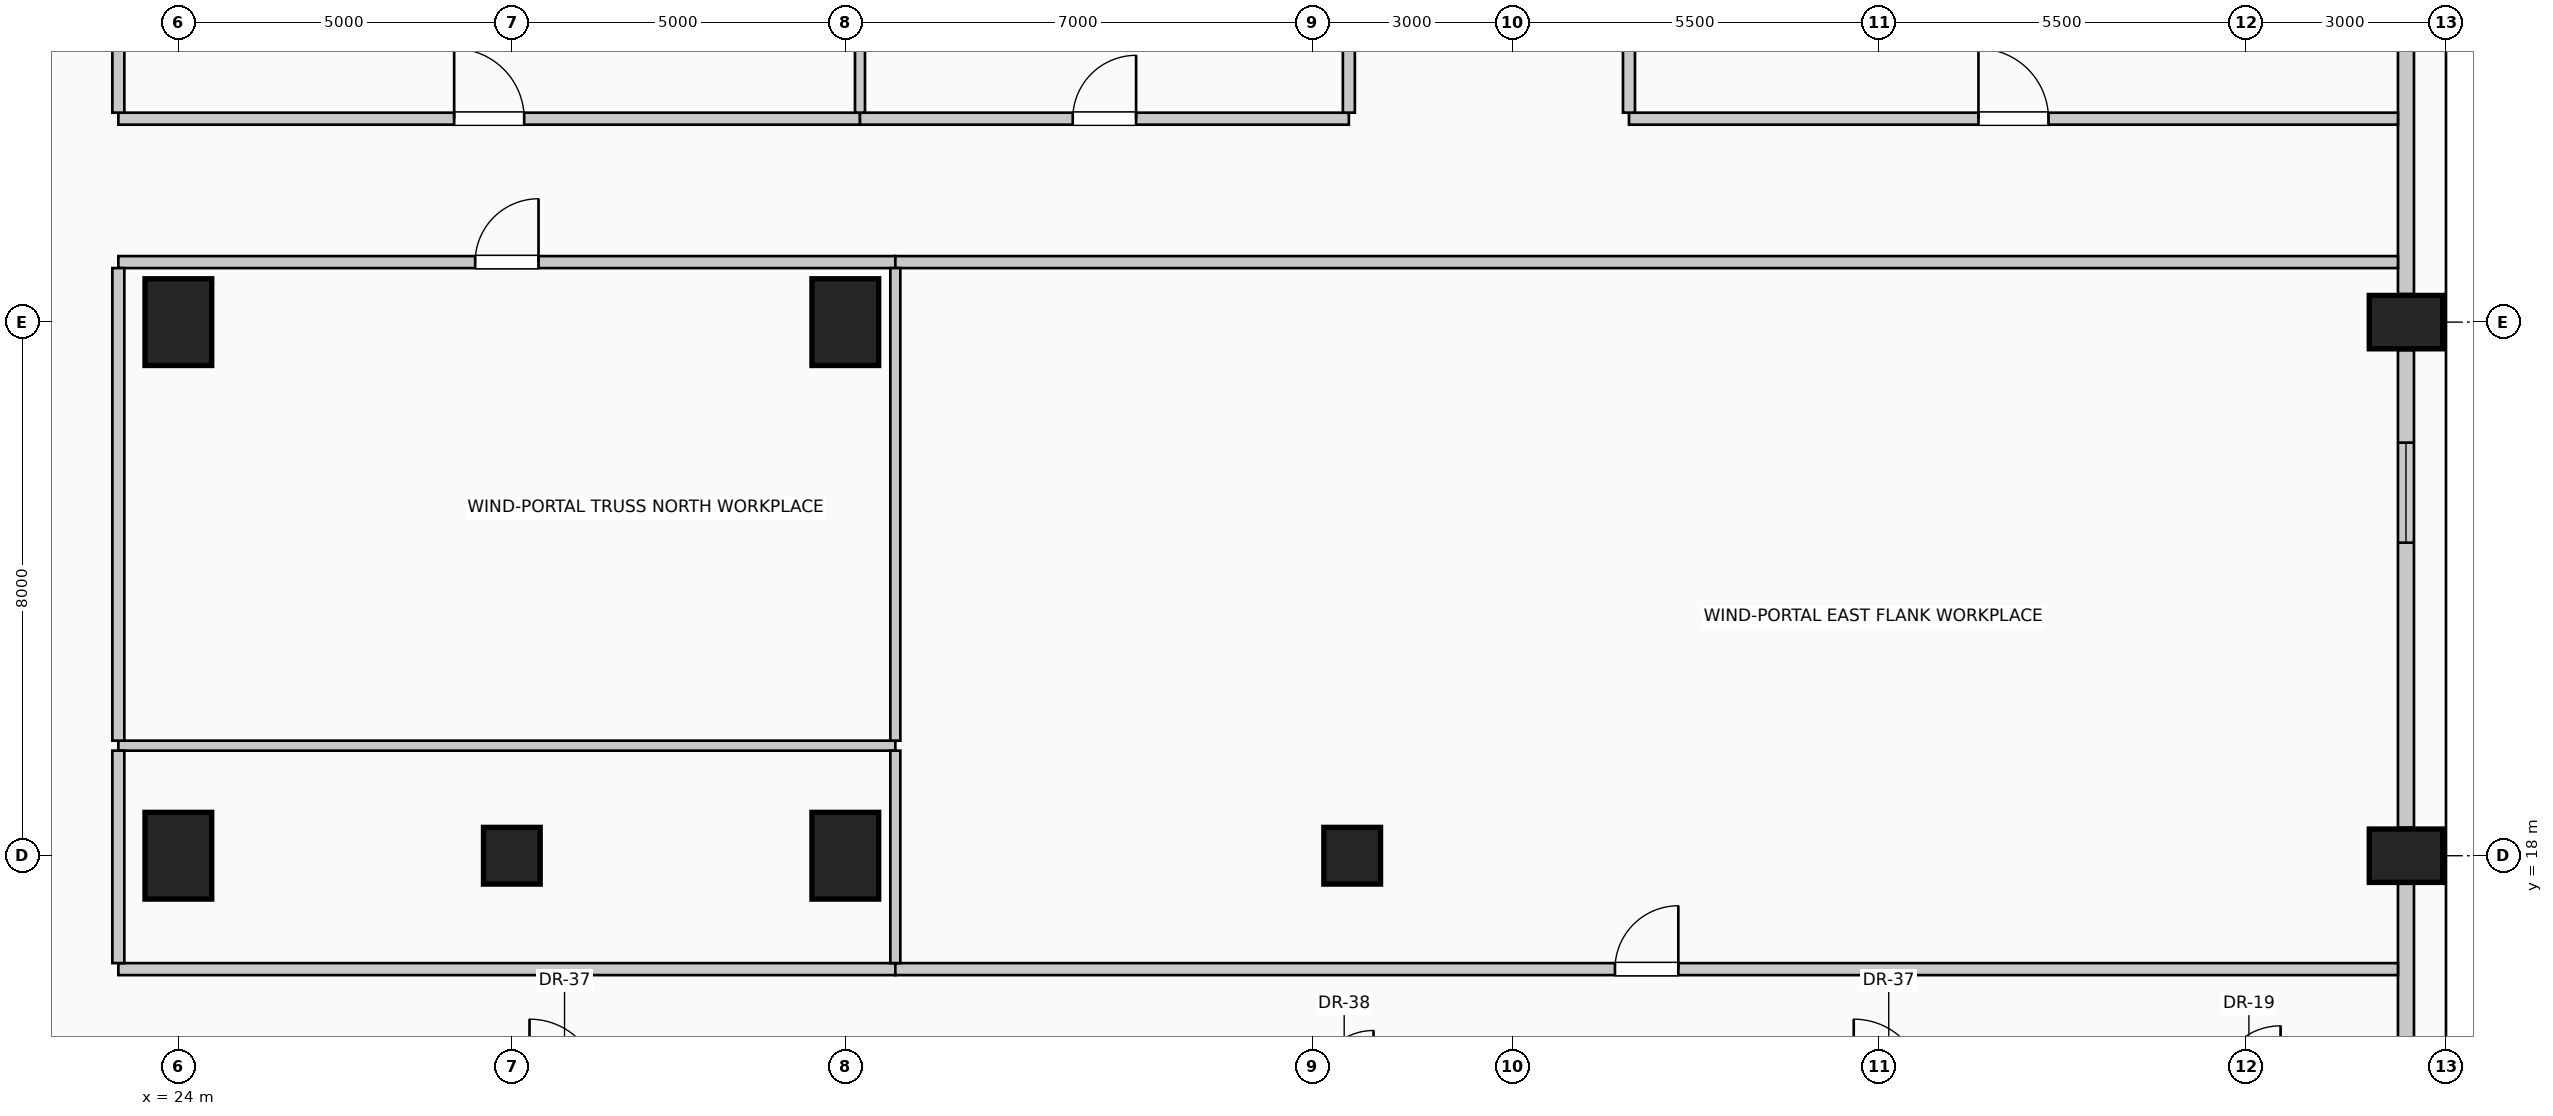
"""IFC4 building model, lengths in metres.
Left out: names, types, materials, properties, quantities, classifications, styles, units other than length and angle.
Written with IfcOpenShell. Run it as: python <this file> out.ifc"""

import sys

from ifc_helpers import new_model, si_unit, direction, frame, frame_2d, origin, origin_2d, place, context, subcontext, project, spatial, rectangle, circle, extrude, element, fill, save


model = new_model("IFC4")
c1 = context("Model", 3, precision=1e-05, world=origin(), true_north=direction((0.0, 1.0)))
c2 = subcontext(c1, "Body", "Model", "MODEL_VIEW")
j1 = project(units=[si_unit("LENGTHUNIT", "METRE"), si_unit("PLANEANGLEUNIT", "RADIAN")], contexts=[c1])
p1 = place(None, origin())
s1 = spatial("IfcSite", under=j1, at=p1, CompositionType="ELEMENT")
p2 = place(p1, origin())
s2 = spatial("IfcBuilding", under=s1, at=p2, CompositionType="ELEMENT")
p3 = place(p2, frame((0.0, 0.0, 202.6)))
s3 = spatial("IfcBuildingStorey", under=s2, at=p3, CompositionType="ELEMENT", Elevation=202.6)
for number, where, z_axis, x_axis in (
    (1, (57.4, 18.0, 0.0), (0.0, 0.0, 1.0), (0.0, 1.0, 0.0)),
    (2, (57.4, 26.0, 0.0), (0.0, 0.0, 1.0), (0.0, 1.0, 0.0)),
):
    element("IfcColumn", number, at=place(p3, frame(where, z_axis=z_axis, x_axis=x_axis)), inside=s3, PredefinedType="COLUMN", context=c2, shape_type="SweptSolid", body=[
        extrude(rectangle(XDim=0.8, YDim=1.1, at=origin_2d()), origin(), (0.0, 0.0, 1.0), 4.0),
    ])
for number, where, z_axis, x_axis in (
    (3, (24.0, 18.0, 0.0), (0.0, 0.0, 1.0), (1.0, 0.0, 0.0)),
    (4, (34.0, 18.0, 0.0), (0.0, 0.0, 1.0), (1.0, 0.0, 0.0)),
    (5, (24.0, 26.0, 0.0), (0.0, 0.0, 1.0), (1.0, 0.0, 0.0)),
    (6, (34.0, 26.0, 0.0), (0.0, 0.0, 1.0), (1.0, 0.0, 0.0)),
):
    element("IfcColumn", number, at=place(p3, frame(where, z_axis=z_axis, x_axis=x_axis)), inside=s3, PredefinedType="COLUMN", context=c2, shape_type="SweptSolid", body=[
        extrude(rectangle(XDim=1.0, YDim=1.3, at=origin_2d()), origin(), (0.0, 0.0, 1.0), 4.0),
    ])
for number, where, z_axis, x_axis in (
    (7, (29.0, 18.0, 0.0), (0.0, 0.0, 1.0), (1.0, 0.0, 0.0)),
    (8, (41.6, 18.0, 0.0), (0.0, 0.0, 1.0), (1.0, 0.0, 0.0)),
):
    element("IfcColumn", number, at=place(p3, frame(where, z_axis=z_axis, x_axis=x_axis)), inside=s3, PredefinedType="COLUMN", context=c2, shape_type="SweptSolid", body=[
        extrude(circle(Radius=0.425, at=origin_2d()), origin(), (0.0, 0.0, 1.0), 4.0),
    ])
p4 = place(p3, frame((57.4, 17.58, 0.0), z_axis=(0.0, 0.0, 1.0), x_axis=(0.0, -1.0, 0.0)))
e9 = element("IfcWall", 9, at=p4, inside=s3, PredefinedType="SOLIDWALL", context=c2, shape_type="SweptSolid", body=[
    extrude(rectangle(XDim=7.16, YDim=0.24, at=frame_2d((3.58, 0.0))), origin(), (0.0, 0.0, 1.0), 3.0),
])
p5 = place(p4, frame((4.273, 0.0, 0.42)))
e10 = element("IfcOpeningElement", 10, at=p5, cuts=e9, PredefinedType="OPENING", context=c2, shape_type="SweptSolid", body=[
    extrude(rectangle(XDim=1.5, YDim=2.2, at=frame_2d((0.75, 1.1))), frame((0.0, 0.13, 0.0), z_axis=(0.0, -1.0, 0.0), x_axis=(1.0, 0.0, 0.0)), (0.0, 0.0, 1.0), 0.26),
])
p6 = place(p3, frame((57.4, 25.58, 0.0), z_axis=(0.0, 0.0, 1.0), x_axis=(0.0, -1.0, 0.0)))
e11 = element("IfcWall", 11, at=p6, inside=s3, PredefinedType="SOLIDWALL", context=c2, shape_type="SweptSolid", body=[
    extrude(rectangle(XDim=7.16, YDim=0.24, at=frame_2d((3.58, 0.0))), origin(), (0.0, 0.0, 1.0), 3.0),
])
p7 = place(p6, frame((1.387, 0.0, 0.42)))
e12 = element("IfcOpeningElement", 12, at=p7, cuts=e11, PredefinedType="OPENING", context=c2, shape_type="SweptSolid", body=[
    extrude(rectangle(XDim=1.5, YDim=2.2, at=frame_2d((0.75, 1.1))), frame((0.0, 0.13, 0.0), z_axis=(0.0, -1.0, 0.0), x_axis=(1.0, 0.0, 0.0)), (0.0, 0.0, 1.0), 0.26),
])
p8 = place(p3, frame((57.4, 33.58, 0.0), z_axis=(0.0, 0.0, 1.0), x_axis=(0.0, -1.0, 0.0)))
e13 = element("IfcWall", 13, at=p8, inside=s3, PredefinedType="SOLIDWALL", context=c2, shape_type="SweptSolid", body=[
    extrude(rectangle(XDim=7.16, YDim=0.24, at=frame_2d((3.58, 0.0))), origin(), (0.0, 0.0, 1.0), 3.0),
])
p9 = place(p3, frame((23.1, 16.3, 0.0), z_axis=(0.0, 0.0, 1.0), x_axis=(1.0, 0.0, 0.0)))
e14 = element("IfcWall", 14, at=p9, inside=s3, PredefinedType="PARTITIONING", context=c2, shape_type="SweptSolid", body=[
    extrude(rectangle(XDim=11.65, YDim=0.18, at=frame_2d((5.825, 0.0))), origin(), (0.0, 0.0, 1.0), 3.75),
])
p10 = place(p3, frame((34.75, 16.3, 0.0), z_axis=(0.0, 0.0, 1.0), x_axis=(1.0, 0.0, 0.0)))
e15 = element("IfcWall", 15, at=p10, inside=s3, PredefinedType="PARTITIONING", context=c2, shape_type="SweptSolid", body=[
    extrude(rectangle(XDim=22.53, YDim=0.18, at=frame_2d((11.265, 0.0))), origin(), (0.0, 0.0, 1.0), 3.75),
])
p11 = place(p10, frame((10.79, 0.0, 0.0)))
e16 = element("IfcOpeningElement", 16, at=p11, cuts=e15, PredefinedType="OPENING", context=c2, shape_type="SweptSolid", body=[
    extrude(rectangle(XDim=0.95, YDim=2.15, at=frame_2d((0.475, 1.075))), frame((0.0, 0.1, 0.0), z_axis=(0.0, -1.0, 0.0), x_axis=(1.0, 0.0, 0.0)), (0.0, 0.0, 1.0), 0.2),
])
p12 = place(p3, frame((23.1, 19.65, 0.0), z_axis=(0.0, 0.0, 1.0), x_axis=(1.0, 0.0, 0.0)))
e17 = element("IfcWall", 17, at=p12, inside=s3, PredefinedType="PARTITIONING", context=c2, shape_type="SweptSolid", body=[
    extrude(rectangle(XDim=11.65, YDim=0.15, at=frame_2d((5.825, 0.0))), origin(), (0.0, 0.0, 1.0), 3.75),
])
p13 = place(p3, frame((23.1, 26.9, 0.0), z_axis=(0.0, 0.0, 1.0), x_axis=(1.0, 0.0, 0.0)))
e18 = element("IfcWall", 18, at=p13, inside=s3, PredefinedType="PARTITIONING", context=c2, shape_type="SweptSolid", body=[
    extrude(rectangle(XDim=11.65, YDim=0.18, at=frame_2d((5.825, 0.0))), origin(), (0.0, 0.0, 1.0), 3.75),
])
p14 = place(p13, frame((5.35, 0.0, 0.0)))
e19 = element("IfcOpeningElement", 19, at=p14, cuts=e18, PredefinedType="OPENING", context=c2, shape_type="SweptSolid", body=[
    extrude(rectangle(XDim=0.95, YDim=2.15, at=frame_2d((0.475, 1.075))), frame((0.0, 0.1, 0.0), z_axis=(0.0, -1.0, 0.0), x_axis=(1.0, 0.0, 0.0)), (0.0, 0.0, 1.0), 0.2),
])
p15 = place(p3, frame((34.75, 26.9, 0.0), z_axis=(0.0, 0.0, 1.0), x_axis=(1.0, 0.0, 0.0)))
e20 = element("IfcWall", 20, at=p15, inside=s3, PredefinedType="PARTITIONING", context=c2, shape_type="SweptSolid", body=[
    extrude(rectangle(XDim=22.53, YDim=0.18, at=frame_2d((11.265, 0.0))), origin(), (0.0, 0.0, 1.0), 3.75),
])
p16 = place(p3, frame((23.1, 29.05, 0.0), z_axis=(0.0, 0.0, 1.0), x_axis=(1.0, 0.0, 0.0)))
e21 = element("IfcWall", 21, at=p16, inside=s3, PredefinedType="PARTITIONING", context=c2, shape_type="SweptSolid", body=[
    extrude(rectangle(XDim=11.12, YDim=0.18, at=frame_2d((5.56, 0.0))), origin(), (0.0, 0.0, 1.0), 3.75),
])
p17 = place(p16, frame((5.035, 0.0, 0.0)))
e22 = element("IfcOpeningElement", 22, at=p17, cuts=e21, PredefinedType="OPENING", context=c2, shape_type="SweptSolid", body=[
    extrude(rectangle(XDim=1.05, YDim=2.15, at=frame_2d((0.525, 1.075))), frame((0.0, 0.1, 0.0), z_axis=(0.0, -1.0, 0.0), x_axis=(1.0, 0.0, 0.0)), (0.0, 0.0, 1.0), 0.2),
])
p18 = place(p3, frame((34.22, 29.05, 0.0), z_axis=(0.0, 0.0, 1.0), x_axis=(1.0, 0.0, 0.0)))
e23 = element("IfcWall", 23, at=p18, inside=s3, PredefinedType="PARTITIONING", context=c2, shape_type="SweptSolid", body=[
    extrude(rectangle(XDim=7.33, YDim=0.18, at=frame_2d((3.665, 0.0))), origin(), (0.0, 0.0, 1.0), 3.75),
])
p19 = place(p18, frame((3.19, 0.0, 0.0)))
e24 = element("IfcOpeningElement", 24, at=p19, cuts=e23, PredefinedType="OPENING", context=c2, shape_type="SweptSolid", body=[
    extrude(rectangle(XDim=0.95, YDim=2.15, at=frame_2d((0.475, 1.075))), frame((0.0, 0.1, 0.0), z_axis=(0.0, -1.0, 0.0), x_axis=(1.0, 0.0, 0.0)), (0.0, 0.0, 1.0), 0.2),
])
p20 = place(p3, frame((45.75, 29.05, 0.0), z_axis=(0.0, 0.0, 1.0), x_axis=(1.0, 0.0, 0.0)))
e25 = element("IfcWall", 25, at=p20, inside=s3, PredefinedType="PARTITIONING", context=c2, shape_type="SweptSolid", body=[
    extrude(rectangle(XDim=11.53, YDim=0.18, at=frame_2d((5.765, 0.0))), origin(), (0.0, 0.0, 1.0), 3.75),
])
p21 = place(p20, frame((5.24, 0.0, 0.0)))
e26 = element("IfcOpeningElement", 26, at=p21, cuts=e25, PredefinedType="OPENING", context=c2, shape_type="SweptSolid", body=[
    extrude(rectangle(XDim=1.05, YDim=2.15, at=frame_2d((0.525, 1.075))), frame((0.0, 0.1, 0.0), z_axis=(0.0, -1.0, 0.0), x_axis=(1.0, 0.0, 0.0)), (0.0, 0.0, 1.0), 0.2),
])
p22 = place(p3, frame((23.1, 16.39, 0.0), z_axis=(0.0, 0.0, 1.0), x_axis=(0.0, 1.0, 0.0)))
e27 = element("IfcWall", 27, at=p22, inside=s3, PredefinedType="PARTITIONING", context=c2, shape_type="SweptSolid", body=[
    extrude(rectangle(XDim=3.185, YDim=0.18, at=frame_2d((1.593, 0.0))), origin(), (0.0, 0.0, 1.0), 3.75),
])
p23 = place(p3, frame((23.1, 19.725, 0.0), z_axis=(0.0, 0.0, 1.0), x_axis=(0.0, 1.0, 0.0)))
e28 = element("IfcWall", 28, at=p23, inside=s3, PredefinedType="PARTITIONING", context=c2, shape_type="SweptSolid", body=[
    extrude(rectangle(XDim=7.085, YDim=0.18, at=frame_2d((3.542, 0.0))), origin(), (0.0, 0.0, 1.0), 3.75),
])
p24 = place(p3, frame((23.1, 29.14, 0.0), z_axis=(0.0, 0.0, 1.0), x_axis=(0.0, 1.0, 0.0)))
e29 = element("IfcWall", 29, at=p24, inside=s3, PredefinedType="PARTITIONING", context=c2, shape_type="SweptSolid", body=[
    extrude(rectangle(XDim=3.12, YDim=0.18, at=frame_2d((1.56, 0.0))), origin(), (0.0, 0.0, 1.0), 3.75),
])
p25 = place(p3, frame((34.22, 29.14, 0.0), z_axis=(0.0, 0.0, 1.0), x_axis=(0.0, 1.0, 0.0)))
e30 = element("IfcWall", 30, at=p25, inside=s3, PredefinedType="PARTITIONING", context=c2, shape_type="SweptSolid", body=[
    extrude(rectangle(XDim=4.21, YDim=0.15, at=frame_2d((2.105, 0.0))), origin(), (0.0, 0.0, 1.0), 3.145),
])
p26 = place(p3, frame((34.75, 16.39, 0.0), z_axis=(0.0, 0.0, 1.0), x_axis=(0.0, 1.0, 0.0)))
e31 = element("IfcWall", 31, at=p26, inside=s3, PredefinedType="PARTITIONING", context=c2, shape_type="SweptSolid", body=[
    extrude(rectangle(XDim=3.185, YDim=0.15, at=frame_2d((1.593, 0.0))), origin(), (0.0, 0.0, 1.0), 3.75),
])
p27 = place(p3, frame((34.75, 19.725, 0.0), z_axis=(0.0, 0.0, 1.0), x_axis=(0.0, 1.0, 0.0)))
e32 = element("IfcWall", 32, at=p27, inside=s3, PredefinedType="PARTITIONING", context=c2, shape_type="SweptSolid", body=[
    extrude(rectangle(XDim=7.085, YDim=0.15, at=frame_2d((3.542, 0.0))), origin(), (0.0, 0.0, 1.0), 3.75),
])
p28 = place(p3, frame((41.55, 29.14, 0.0), z_axis=(0.0, 0.0, 1.0), x_axis=(0.0, 1.0, 0.0)))
e33 = element("IfcWall", 33, at=p28, inside=s3, PredefinedType="PARTITIONING", context=c2, shape_type="SweptSolid", body=[
    extrude(rectangle(XDim=3.21, YDim=0.18, at=frame_2d((1.605, 0.0))), origin(), (0.0, 0.0, 1.0), 3.145),
])
p29 = place(p3, frame((45.75, 29.14, 0.0), z_axis=(0.0, 0.0, 1.0), x_axis=(0.0, 1.0, 0.0)))
e34 = element("IfcWall", 34, at=p29, inside=s3, PredefinedType="PARTITIONING", context=c2, shape_type="SweptSolid", body=[
    extrude(rectangle(XDim=3.135, YDim=0.18, at=frame_2d((1.567, 0.0))), origin(), (0.0, 0.0, 1.0), 3.75),
])
p30 = place(p7, origin())
e35 = element("IfcWindow", 35, at=p30, inside=s3, PartitioningType="SINGLE_PANEL", PredefinedType="WINDOW", context=c2, shape_type="SweptSolid", body=[
    extrude(rectangle(XDim=1.5, YDim=2.2, at=frame_2d((0.75, 1.1))), frame((0.0, 0.03, 0.0), z_axis=(0.0, -1.0, 0.0), x_axis=(1.0, 0.0, 0.0)), (0.0, 0.0, 1.0), 0.06),
])
fill(e12, e35)
p31 = place(p11, origin())
e36 = element("IfcDoor", 36, at=p31, inside=s3, OperationType="SINGLE_SWING_RIGHT", PredefinedType="DOOR", context=c2, shape_type="SweptSolid", body=[
    extrude(rectangle(XDim=0.95, YDim=2.15, at=frame_2d((0.475, 1.075))), frame((0.0, 0.025, 0.0), z_axis=(0.0, -1.0, 0.0), x_axis=(1.0, 0.0, 0.0)), (0.0, 0.0, 1.0), 0.05),
])
fill(e16, e36)
p32 = place(p14, origin())
e37 = element("IfcDoor", 37, at=p32, inside=s3, OperationType="SINGLE_SWING_RIGHT", PredefinedType="DOOR", context=c2, shape_type="SweptSolid", body=[
    extrude(rectangle(XDim=0.95, YDim=2.15, at=frame_2d((0.475, 1.075))), frame((0.0, 0.025, 0.0), z_axis=(0.0, -1.0, 0.0), x_axis=(1.0, 0.0, 0.0)), (0.0, 0.0, 1.0), 0.05),
])
fill(e19, e37)
p33 = place(p17, origin())
e38 = element("IfcDoor", 38, at=p33, inside=s3, OperationType="SINGLE_SWING_LEFT", PredefinedType="DOOR", context=c2, shape_type="SweptSolid", body=[
    extrude(rectangle(XDim=1.05, YDim=2.15, at=frame_2d((0.525, 1.075))), frame((0.0, 0.025, 0.0), z_axis=(0.0, -1.0, 0.0), x_axis=(1.0, 0.0, 0.0)), (0.0, 0.0, 1.0), 0.05),
])
fill(e22, e38)
p34 = place(p19, origin())
e39 = element("IfcDoor", 39, at=p34, inside=s3, OperationType="SINGLE_SWING_RIGHT", PredefinedType="DOOR", context=c2, shape_type="SweptSolid", body=[
    extrude(rectangle(XDim=0.95, YDim=2.15, at=frame_2d((0.475, 1.075))), frame((0.0, 0.025, 0.0), z_axis=(0.0, -1.0, 0.0), x_axis=(1.0, 0.0, 0.0)), (0.0, 0.0, 1.0), 0.05),
])
fill(e24, e39)
p35 = place(p21, origin())
e40 = element("IfcDoor", 40, at=p35, inside=s3, OperationType="SINGLE_SWING_LEFT", PredefinedType="DOOR", context=c2, shape_type="SweptSolid", body=[
    extrude(rectangle(XDim=1.05, YDim=2.15, at=frame_2d((0.525, 1.075))), frame((0.0, 0.025, 0.0), z_axis=(0.0, -1.0, 0.0), x_axis=(1.0, 0.0, 0.0)), (0.0, 0.0, 1.0), 0.05),
])
fill(e26, e40)
save(model, sys.argv[1])
